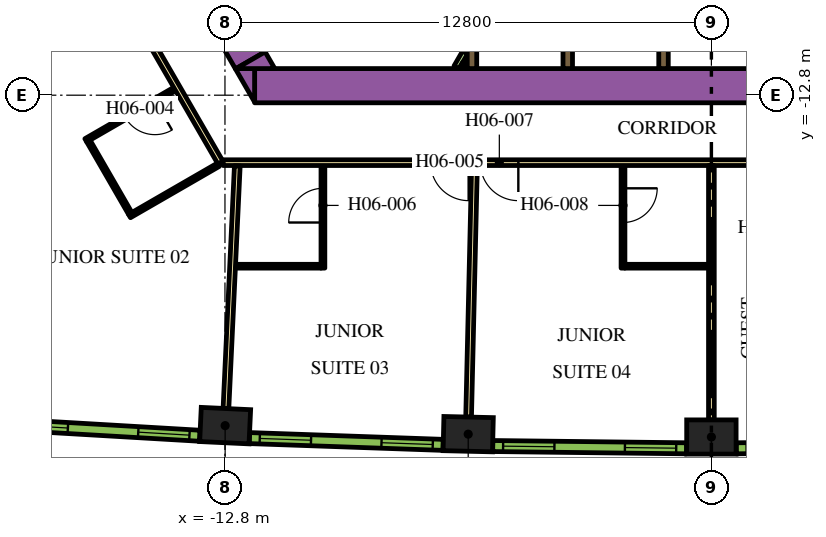
"""IFC4 building model, lengths in metres.
Left out: names, types, materials, properties, quantities, classifications, styles, units other than length and angle.
Written with IfcOpenShell. Run it as: python <this file> out.ifc"""

import sys

from ifc_helpers import new_model, si_unit, direction, frame, frame_2d, origin, origin_2d, place, context, subcontext, project, spatial, polyline, rectangle, outline, extrude, element, fill, save


model = new_model("IFC4")
c1 = context("Model", 3, precision=1e-05, world=origin(), true_north=direction((0.0, 1.0)))
c2 = subcontext(c1, "Body", "Model", "MODEL_VIEW")
j1 = project(units=[si_unit("LENGTHUNIT", "METRE"), si_unit("PLANEANGLEUNIT", "RADIAN")], contexts=[c1])
p1 = place(None, origin())
s1 = spatial("IfcSite", under=j1, at=p1, CompositionType="ELEMENT")
p2 = place(p1, origin())
s2 = spatial("IfcBuilding", under=s1, at=p2, CompositionType="ELEMENT")
p3 = place(p2, frame((0.0, 0.0, 87.6)))
s3 = spatial("IfcBuildingStorey", under=s2, at=p3, CompositionType="ELEMENT", Elevation=87.6)
for number, where, z_axis, x_axis in (
    (1, (-12.795, -21.494, 0.0), (0.0, 0.0, 1.0), (0.999, -0.047, 0.0)),
    (2, (-6.399, -21.719, 0.0), (0.0, 0.0, 1.0), (1.0, -0.023, 0.0)),
    (3, (0.0, -21.794, 0.0), (0.0, 0.0, 1.0), (1.0, 0.0, 0.0)),
):
    element("IfcColumn", number, at=place(p3, frame(where, z_axis=z_axis, x_axis=x_axis)), inside=s3, PredefinedType="COLUMN", context=c2, shape_type="SweptSolid", body=[
        extrude(rectangle(XDim=1.3, YDim=0.9, at=origin_2d()), origin(), (0.0, 0.0, 1.0), 3.9),
    ])
p4 = place(p3, frame((-12.019, -12.55, 0.0), z_axis=(0.0, 0.0, 1.0), x_axis=(1.0, 0.0, 0.0)))
e4 = element("IfcWall", 4, at=p4, inside=s3, PredefinedType="SOLIDWALL", context=c2, shape_type="SweptSolid", body=[
    extrude(rectangle(XDim=21.63, YDim=0.9, at=frame_2d((10.815, 0.0))), origin(), (0.0, 0.0, 1.0), 3.9),
])
p5 = place(p3, origin())
e5 = element("IfcWall", 5, at=p5, inside=s3, PredefinedType="SOLIDWALL", context=c2, shape_type="SweptSolid", body=[
    extrude(outline(polyline([(-12.529, -12.1), (-12.021, -12.1), (-12.021, -12.98), (-12.529, -12.1)])), origin(), (0.0, 0.0, 1.0), 3.9),
])
p6 = place(p3, frame((-12.134, -11.883, 0.0), z_axis=(0.0, 0.0, 1.0), x_axis=(-0.500005339912, 0.866022320763, 0.0)))
e6 = element("IfcWall", 6, at=p6, inside=s3, PredefinedType="SOLIDWALL", context=c2, shape_type="SweptSolid", body=[
    extrude(rectangle(XDim=9.488, YDim=0.9, at=frame_2d((4.744, 0.0))), origin(), (0.0, 0.0, 1.0), 3.9),
])
e7 = element("IfcWall", 7, at=p5, inside=s3, PredefinedType="SOLIDWALL", context=c2, shape_type="SweptSolid", body=[
    extrude(outline(polyline([(-11.489, -12.1), (-12.505, -12.1), (-11.743, -11.66), (-11.489, -12.1)])), origin(), (0.0, 0.0, 1.0), 3.9),
])
p7 = place(p3, frame((-3.78, -12.1, 0.0), z_axis=(0.0, 0.0, 1.0), x_axis=(0.0, 1.0, 0.0)))
e8 = element("IfcWall", 8, at=p7, inside=s3, PredefinedType="SOLIDWALL", context=c2, shape_type="SweptSolid", body=[
    extrude(rectangle(XDim=2.2, YDim=0.25, at=frame_2d((1.1, 0.0))), origin(), (0.0, 0.0, 1.0), 3.9),
])
p8 = place(p3, frame((-6.3, -12.1, 0.0), z_axis=(0.0, 0.0, 1.0), x_axis=(0.0, 1.0, 0.0)))
e9 = element("IfcWall", 9, at=p8, inside=s3, PredefinedType="SOLIDWALL", context=c2, shape_type="SweptSolid", body=[
    extrude(rectangle(XDim=3.146, YDim=0.25, at=frame_2d((1.573, 0.0))), origin(), (0.0, 0.0, 1.0), 3.9),
])
p9 = place(p3, frame((-1.26, -12.1, 0.0), z_axis=(0.0, 0.0, 1.0), x_axis=(0.0, 1.0, 0.0)))
e10 = element("IfcWall", 10, at=p9, inside=s3, PredefinedType="SOLIDWALL", context=c2, shape_type="SweptSolid", body=[
    extrude(rectangle(XDim=2.2, YDim=0.25, at=frame_2d((1.1, 0.0))), origin(), (0.0, 0.0, 1.0), 3.9),
])
p10 = place(p3, frame((-6.708, -12.068, 0.0), z_axis=(0.0, 0.0, 1.0), x_axis=(0.500000789788, 0.8660249478, 0.0)))
e11 = element("IfcWall", 11, at=p10, inside=s3, PredefinedType="PARTITIONING", context=c2, shape_type="SweptSolid", body=[
    extrude(rectangle(XDim=0.456, YDim=0.15, at=frame_2d((0.228, 0.0))), origin(), (0.0, 0.0, 1.0), 2.75),
])
p11 = place(p3, frame((-6.534, -12.068, 0.0), z_axis=(0.0, 0.0, 1.0), x_axis=(0.500240224089, 0.865886665912, 0.0)))
e12 = element("IfcWall", 12, at=p11, inside=s3, PredefinedType="PARTITIONING", context=c2, shape_type="SweptSolid", body=[
    extrude(rectangle(XDim=0.109, YDim=0.15, at=frame_2d((0.054, 0.0))), origin(), (0.0, 0.0, 1.0), 2.75),
])
p12 = place(p3, frame((-28.211, -15.335, 0.0), z_axis=(0.0, 0.0, 1.0), x_axis=(0.866025884867, 0.49999916674, 0.0)))
e13 = element("IfcWall", 13, at=p12, inside=s3, PredefinedType="PARTITIONING", context=c2, shape_type="SweptSolid", body=[
    extrude(rectangle(XDim=13.543, YDim=0.15, at=frame_2d((6.772, 0.0))), origin(), (0.0, 0.0, 1.0), 2.75),
])
p13 = place(p12, frame((12.214, 0.0, 0.0)))
e14 = element("IfcOpeningElement", 14, at=p13, cuts=e13, PredefinedType="OPENING", context=c2, shape_type="SweptSolid", body=[
    extrude(rectangle(XDim=1.0, YDim=2.1, at=frame_2d((0.5, 1.05))), frame((0.0, 0.085, 0.0), z_axis=(0.0, -1.0, 0.0), x_axis=(1.0, 0.0, 0.0)), (0.0, 0.0, 1.0), 0.17),
])
p14 = place(p12, frame((8.488, 0.0, 0.0)))
e15 = element("IfcOpeningElement", 15, at=p14, cuts=e13, PredefinedType="OPENING", context=c2, shape_type="SweptSolid", body=[
    extrude(rectangle(XDim=1.0, YDim=2.1, at=frame_2d((0.5, 1.05))), frame((0.0, 0.085, 0.0), z_axis=(0.0, -1.0, 0.0), x_axis=(1.0, 0.0, 0.0)), (0.0, 0.0, 1.0), 0.17),
])
p15 = place(p3, frame((-15.587, -9.952, 0.0), z_axis=(0.0, 0.0, 1.0), x_axis=(-0.866017869832, -0.500013048961, 0.0)))
e16 = element("IfcWall", 16, at=p15, inside=s3, PredefinedType="PARTITIONING", context=c2, shape_type="SweptSolid", body=[
    extrude(rectangle(XDim=13.624, YDim=0.15, at=frame_2d((6.812, 0.0))), origin(), (0.0, 0.0, 1.0), 2.75),
])
p16 = place(p15, frame((4.134, 0.0, 0.0)))
e17 = element("IfcOpeningElement", 17, at=p16, cuts=e16, PredefinedType="OPENING", context=c2, shape_type="SweptSolid", body=[
    extrude(rectangle(XDim=1.0, YDim=2.1, at=frame_2d((0.5, 1.05))), frame((0.0, 0.085, 0.0), z_axis=(0.0, -1.0, 0.0), x_axis=(1.0, 0.0, 0.0)), (0.0, 0.0, 1.0), 0.17),
])
p17 = place(p3, frame((-12.918, -14.575, 0.0), z_axis=(0.0, 0.0, 1.0), x_axis=(-0.500009150678, 0.866020120573, 0.0)))
e18 = element("IfcWall", 18, at=p17, inside=s3, PredefinedType="PARTITIONING", context=c2, shape_type="SweptSolid", body=[
    extrude(rectangle(XDim=5.258, YDim=0.15, at=frame_2d((2.629, 0.0))), origin(), (0.0, 0.0, 1.0), 2.75),
])
p18 = place(p17, frame((4.078, 0.0, 0.0)))
e19 = element("IfcOpeningElement", 19, at=p18, cuts=e18, PredefinedType="OPENING", context=c2, shape_type="SweptSolid", body=[
    extrude(rectangle(XDim=1.0, YDim=2.1, at=frame_2d((0.5, 1.05))), frame((0.0, 0.085, 0.0), z_axis=(0.0, -1.0, 0.0), x_axis=(1.0, 0.0, 0.0)), (0.0, 0.0, 1.0), 0.17),
])
p19 = place(p3, frame((12.918, -14.575, 0.0), z_axis=(0.0, 0.0, 1.0), x_axis=(-1.0, 0.0, 0.0)))
e20 = element("IfcWall", 20, at=p19, inside=s3, PredefinedType="PARTITIONING", context=c2, shape_type="SweptSolid", body=[
    extrude(rectangle(XDim=25.766, YDim=0.15, at=frame_2d((12.883, 0.0))), origin(), (0.0, 0.0, 1.0), 2.75),
])
p20 = place(p19, frame((19.306, 0.0, 0.0)))
e21 = element("IfcOpeningElement", 21, at=p20, cuts=e20, PredefinedType="OPENING", context=c2, shape_type="SweptSolid", body=[
    extrude(rectangle(XDim=1.0, YDim=2.1, at=frame_2d((0.5, 1.05))), frame((0.0, 0.085, 0.0), z_axis=(0.0, -1.0, 0.0), x_axis=(1.0, 0.0, 0.0)), (0.0, 0.0, 1.0), 0.17),
])
p21 = place(p19, frame((17.999, 0.0, 0.0)))
e22 = element("IfcOpeningElement", 22, at=p21, cuts=e20, PredefinedType="OPENING", context=c2, shape_type="SweptSolid", body=[
    extrude(rectangle(XDim=1.0, YDim=2.1, at=frame_2d((0.5, 1.05))), frame((0.0, 0.085, 0.0), z_axis=(0.0, -1.0, 0.0), x_axis=(1.0, 0.0, 0.0)), (0.0, 0.0, 1.0), 0.17),
])
p22 = place(p19, frame((10.874, 0.0, 0.0)))
e23 = element("IfcOpeningElement", 23, at=p22, cuts=e20, PredefinedType="OPENING", context=c2, shape_type="SweptSolid", body=[
    extrude(rectangle(XDim=0.9, YDim=2.1, at=frame_2d((0.45, 1.05))), frame((0.0, 0.085, 0.0), z_axis=(0.0, -1.0, 0.0), x_axis=(1.0, 0.0, 0.0)), (0.0, 0.0, 1.0), 0.17),
])
p23 = place(p19, frame((8.647, 0.0, 0.0)))
e24 = element("IfcOpeningElement", 24, at=p23, cuts=e20, PredefinedType="OPENING", context=c2, shape_type="SweptSolid", body=[
    extrude(rectangle(XDim=1.0, YDim=2.1, at=frame_2d((0.5, 1.05))), frame((0.0, 0.085, 0.0), z_axis=(0.0, -1.0, 0.0), x_axis=(1.0, 0.0, 0.0)), (0.0, 0.0, 1.0), 0.17),
])
p24 = place(p19, frame((0.18, 0.0, 0.0)))
e25 = element("IfcOpeningElement", 25, at=p24, cuts=e20, PredefinedType="OPENING", context=c2, shape_type="SweptSolid", body=[
    extrude(rectangle(XDim=1.0, YDim=2.1, at=frame_2d((0.5, 1.05))), frame((0.0, 0.085, 0.0), z_axis=(0.0, -1.0, 0.0), x_axis=(1.0, 0.0, 0.0)), (0.0, 0.0, 1.0), 0.17),
])
p25 = place(p3, frame((-12.774, -21.045, 0.0), z_axis=(0.0, 0.0, 1.0), x_axis=(0.046750341626, 0.998906605023, 0.0)))
e26 = element("IfcWall", 26, at=p25, inside=s3, PredefinedType="PARTITIONING", context=c2, shape_type="SweptSolid", body=[
    extrude(rectangle(XDim=6.392, YDim=0.15, at=frame_2d((3.196, 0.0))), origin(), (0.0, 0.0, 1.0), 2.75),
])
p26 = place(p3, frame((-6.389, -21.269, 0.0), z_axis=(0.0, 0.0, 1.0), x_axis=(0.023377429176, 0.999726710559, 0.0)))
e27 = element("IfcWall", 27, at=p26, inside=s3, PredefinedType="PARTITIONING", context=c2, shape_type="SweptSolid", body=[
    extrude(rectangle(XDim=6.611, YDim=0.15, at=frame_2d((3.305, 0.0))), origin(), (0.0, 0.0, 1.0), 2.75),
])
p27 = place(p3, frame((0.0, -21.344, 0.0), z_axis=(0.0, 0.0, 1.0), x_axis=(0.0, 1.0, 0.0)))
e28 = element("IfcWall", 28, at=p27, inside=s3, PredefinedType="PARTITIONING", context=c2, shape_type="SweptSolid", body=[
    extrude(rectangle(XDim=6.694, YDim=0.15, at=frame_2d((3.347, 0.0))), origin(), (0.0, 0.0, 1.0), 2.75),
])
p28 = place(p3, frame((-14.123, -12.638, 0.0), z_axis=(0.0, 0.0, 1.0), x_axis=(-0.86599734893, -0.500048589285, 0.0)))
e29 = element("IfcWall", 29, at=p28, inside=s3, PredefinedType="PARTITIONING", context=c2, shape_type="SweptSolid", body=[
    extrude(rectangle(XDim=2.7, YDim=0.1, at=frame_2d((1.35, 0.0))), origin(), (0.0, 0.0, 1.0), 2.75),
])
p29 = place(p28, frame((0.6, 0.0, 0.0)))
e30 = element("IfcOpeningElement", 30, at=p29, cuts=e29, PredefinedType="OPENING", context=c2, shape_type="SweptSolid", body=[
    extrude(rectangle(XDim=0.9, YDim=2.1, at=frame_2d((0.45, 1.05))), frame((0.0, 0.06, 0.0), z_axis=(0.0, -1.0, 0.0), x_axis=(1.0, 0.0, 0.0)), (0.0, 0.0, 1.0), 0.12),
])
p30 = place(p3, frame((-16.393, -14.006, 0.0), z_axis=(0.0, 0.0, 1.0), x_axis=(0.499946605688, -0.86605622881, 0.0)))
e31 = element("IfcWall", 31, at=p30, inside=s3, PredefinedType="PARTITIONING", context=c2, shape_type="SweptSolid", body=[
    extrude(rectangle(XDim=2.2, YDim=0.1, at=frame_2d((1.1, 0.0))), origin(), (0.0, 0.0, 1.0), 2.75),
])
p31 = place(p3, frame((-12.973, -14.63, 0.0), z_axis=(0.0, 0.0, 1.0), x_axis=(-0.866036505625, -0.499980770555, 0.0)))
e32 = element("IfcWall", 32, at=p31, inside=s3, PredefinedType="PARTITIONING", context=c2, shape_type="SweptSolid", body=[
    extrude(rectangle(XDim=2.7, YDim=0.1, at=frame_2d((1.35, 0.0))), origin(), (0.0, 0.0, 1.0), 2.75),
])
p32 = place(p3, frame((-10.222, -17.35, 0.0), z_axis=(0.0, 0.0, 1.0), x_axis=(0.0, 1.0, 0.0)))
e33 = element("IfcWall", 33, at=p32, inside=s3, PredefinedType="PARTITIONING", context=c2, shape_type="SweptSolid", body=[
    extrude(rectangle(XDim=2.7, YDim=0.1, at=frame_2d((1.35, 0.0))), origin(), (0.0, 0.0, 1.0), 2.75),
])
p33 = place(p32, frame((1.2, 0.0, 0.0)))
e34 = element("IfcOpeningElement", 34, at=p33, cuts=e33, PredefinedType="OPENING", context=c2, shape_type="SweptSolid", body=[
    extrude(rectangle(XDim=0.9, YDim=2.1, at=frame_2d((0.45, 1.05))), frame((0.0, 0.06, 0.0), z_axis=(0.0, -1.0, 0.0), x_axis=(1.0, 0.0, 0.0)), (0.0, 0.0, 1.0), 0.12),
])
p34 = place(p3, frame((-10.272, -17.3, 0.0), z_axis=(0.0, 0.0, 1.0), x_axis=(-1.0, 0.0, 0.0)))
e35 = element("IfcWall", 35, at=p34, inside=s3, PredefinedType="PARTITIONING", context=c2, shape_type="SweptSolid", body=[
    extrude(rectangle(XDim=2.25, YDim=0.1, at=frame_2d((1.125, 0.0))), origin(), (0.0, 0.0, 1.0), 2.75),
])
p35 = place(p3, frame((-2.326, -14.65, 0.0), z_axis=(0.0, 0.0, 1.0), x_axis=(0.0, -1.0, 0.0)))
e36 = element("IfcWall", 36, at=p35, inside=s3, PredefinedType="PARTITIONING", context=c2, shape_type="SweptSolid", body=[
    extrude(rectangle(XDim=2.7, YDim=0.1, at=frame_2d((1.35, 0.0))), origin(), (0.0, 0.0, 1.0), 2.75),
])
p36 = place(p35, frame((0.6, 0.0, 0.0)))
e37 = element("IfcOpeningElement", 37, at=p36, cuts=e36, PredefinedType="OPENING", context=c2, shape_type="SweptSolid", body=[
    extrude(rectangle(XDim=0.9, YDim=2.1, at=frame_2d((0.45, 1.05))), frame((0.0, 0.06, 0.0), z_axis=(0.0, -1.0, 0.0), x_axis=(1.0, 0.0, 0.0)), (0.0, 0.0, 1.0), 0.12),
])
p37 = place(p3, frame((-2.276, -17.3, 0.0), z_axis=(0.0, 0.0, 1.0), x_axis=(1.0, 0.0, 0.0)))
e38 = element("IfcWall", 38, at=p37, inside=s3, PredefinedType="PARTITIONING", context=c2, shape_type="SweptSolid", body=[
    extrude(rectangle(XDim=2.2, YDim=0.1, at=frame_2d((1.1, 0.0))), origin(), (0.0, 0.0, 1.0), 2.75),
])
p38 = place(p3, frame((-18.553, -21.463, 0.0), z_axis=(0.0, 0.0, 1.0), x_axis=(0.998290511436, -0.058447025388, 0.0)))
e39 = element("IfcWall", 39, at=p38, inside=s3, PredefinedType="SOLIDWALL", context=c2, shape_type="SweptSolid", body=[
    extrude(rectangle(XDim=5.1, YDim=0.29, at=frame_2d((2.55, 0.0))), origin(), (0.0, 0.0, 1.0), 3.65),
])
p39 = place(p38, frame((0.273, 0.0, 0.9)))
e40 = element("IfcOpeningElement", 40, at=p39, cuts=e39, PredefinedType="OPENING", context=c2, shape_type="SweptSolid", body=[
    extrude(rectangle(XDim=1.35, YDim=2.15, at=frame_2d((0.675, 1.075))), frame((0.0, 0.155, 0.0), z_axis=(0.0, -1.0, 0.0), x_axis=(1.0, 0.0, 0.0)), (0.0, 0.0, 1.0), 0.31),
])
p40 = place(p38, frame((3.478, 0.0, 0.9)))
e41 = element("IfcOpeningElement", 41, at=p40, cuts=e39, PredefinedType="OPENING", context=c2, shape_type="SweptSolid", body=[
    extrude(rectangle(XDim=1.35, YDim=2.15, at=frame_2d((0.675, 1.075))), frame((0.0, 0.155, 0.0), z_axis=(0.0, -1.0, 0.0), x_axis=(1.0, 0.0, 0.0)), (0.0, 0.0, 1.0), 0.31),
])
p41 = place(p3, frame((-12.157, -21.822, 0.0), z_axis=(0.0, 0.0, 1.0), x_axis=(0.999385993957, -0.035037623812, 0.0)))
e42 = element("IfcWall", 42, at=p41, inside=s3, PredefinedType="SOLIDWALL", context=c2, shape_type="SweptSolid", body=[
    extrude(rectangle(XDim=5.101, YDim=0.29, at=frame_2d((2.55, 0.0))), origin(), (0.0, 0.0, 1.0), 3.65),
])
p42 = place(p41, frame((0.273, 0.0, 0.9)))
e43 = element("IfcOpeningElement", 43, at=p42, cuts=e42, PredefinedType="OPENING", context=c2, shape_type="SweptSolid", body=[
    extrude(rectangle(XDim=1.35, YDim=2.15, at=frame_2d((0.675, 1.075))), frame((0.0, 0.155, 0.0), z_axis=(0.0, -1.0, 0.0), x_axis=(1.0, 0.0, 0.0)), (0.0, 0.0, 1.0), 0.31),
])
p43 = place(p41, frame((3.478, 0.0, 0.9)))
e44 = element("IfcOpeningElement", 44, at=p43, cuts=e42, PredefinedType="OPENING", context=c2, shape_type="SweptSolid", body=[
    extrude(rectangle(XDim=1.35, YDim=2.15, at=frame_2d((0.675, 1.075))), frame((0.0, 0.155, 0.0), z_axis=(0.0, -1.0, 0.0), x_axis=(1.0, 0.0, 0.0)), (0.0, 0.0, 1.0), 0.31),
])
p44 = place(p3, frame((-5.753, -22.031, 0.0), z_axis=(0.0, 0.0, 1.0), x_axis=(0.999931786565, -0.011679992145, 0.0)))
e45 = element("IfcWall", 45, at=p44, inside=s3, PredefinedType="SOLIDWALL", context=c2, shape_type="SweptSolid", body=[
    extrude(rectangle(XDim=5.1, YDim=0.29, at=frame_2d((2.55, 0.0))), origin(), (0.0, 0.0, 1.0), 3.65),
])
p45 = place(p44, frame((0.272, 0.0, 0.9)))
e46 = element("IfcOpeningElement", 46, at=p45, cuts=e45, PredefinedType="OPENING", context=c2, shape_type="SweptSolid", body=[
    extrude(rectangle(XDim=1.35, YDim=2.15, at=frame_2d((0.675, 1.075))), frame((0.0, 0.155, 0.0), z_axis=(0.0, -1.0, 0.0), x_axis=(1.0, 0.0, 0.0)), (0.0, 0.0, 1.0), 0.31),
])
p46 = place(p44, frame((3.478, 0.0, 0.9)))
e47 = element("IfcOpeningElement", 47, at=p46, cuts=e45, PredefinedType="OPENING", context=c2, shape_type="SweptSolid", body=[
    extrude(rectangle(XDim=1.35, YDim=2.15, at=frame_2d((0.675, 1.075))), frame((0.0, 0.155, 0.0), z_axis=(0.0, -1.0, 0.0), x_axis=(1.0, 0.0, 0.0)), (0.0, 0.0, 1.0), 0.31),
])
p47 = place(p3, frame((0.653, -22.091, 0.0), z_axis=(0.0, 0.0, 1.0), x_axis=(0.999931786565, 0.011679992145, 0.0)))
e48 = element("IfcWall", 48, at=p47, inside=s3, PredefinedType="SOLIDWALL", context=c2, shape_type="SweptSolid", body=[
    extrude(rectangle(XDim=5.1, YDim=0.29, at=frame_2d((2.55, 0.0))), origin(), (0.0, 0.0, 1.0), 3.65),
])
p48 = place(p47, frame((0.273, 0.0, 0.9)))
e49 = element("IfcOpeningElement", 49, at=p48, cuts=e48, PredefinedType="OPENING", context=c2, shape_type="SweptSolid", body=[
    extrude(rectangle(XDim=1.35, YDim=2.15, at=frame_2d((0.675, 1.075))), frame((0.0, 0.155, 0.0), z_axis=(0.0, -1.0, 0.0), x_axis=(1.0, 0.0, 0.0)), (0.0, 0.0, 1.0), 0.31),
])
p49 = place(p47, frame((3.478, 0.0, 0.9)))
e50 = element("IfcOpeningElement", 50, at=p49, cuts=e48, PredefinedType="OPENING", context=c2, shape_type="SweptSolid", body=[
    extrude(rectangle(XDim=1.35, YDim=2.15, at=frame_2d((0.675, 1.075))), frame((0.0, 0.155, 0.0), z_axis=(0.0, -1.0, 0.0), x_axis=(1.0, 0.0, 0.0)), (0.0, 0.0, 1.0), 0.31),
])
p50 = place(p29, origin())
e51 = element("IfcDoor", 51, at=p50, inside=s3, OperationType="SINGLE_SWING_LEFT", PredefinedType="DOOR", context=c2, shape_type="SweptSolid", body=[
    extrude(rectangle(XDim=0.9, YDim=2.1, at=frame_2d((0.45, 1.05))), frame((0.0, 0.025, 0.0), z_axis=(0.0, -1.0, 0.0), x_axis=(1.0, 0.0, 0.0)), (0.0, 0.0, 1.0), 0.05),
])
fill(e30, e51)
p51 = place(p20, origin())
e52 = element("IfcDoor", 52, at=p51, inside=s3, OperationType="SINGLE_SWING_LEFT", PredefinedType="DOOR", context=c2, shape_type="SweptSolid", body=[
    extrude(rectangle(XDim=1.0, YDim=2.1, at=frame_2d((0.5, 1.05))), frame((0.0, 0.025, 0.0), z_axis=(0.0, -1.0, 0.0), x_axis=(1.0, 0.0, 0.0)), (0.0, 0.0, 1.0), 0.05),
])
fill(e21, e52)
p52 = place(p33, origin())
e53 = element("IfcDoor", 53, at=p52, inside=s3, OperationType="SINGLE_SWING_RIGHT", PredefinedType="DOOR", context=c2, shape_type="SweptSolid", body=[
    extrude(rectangle(XDim=0.9, YDim=2.1, at=frame_2d((0.45, 1.05))), frame((0.0, 0.025, 0.0), z_axis=(0.0, -1.0, 0.0), x_axis=(1.0, 0.0, 0.0)), (0.0, 0.0, 1.0), 0.05),
])
fill(e34, e53)
p53 = place(p21, origin())
e54 = element("IfcDoor", 54, at=p53, inside=s3, OperationType="SINGLE_SWING_RIGHT", PredefinedType="DOOR", context=c2, shape_type="SweptSolid", body=[
    extrude(rectangle(XDim=1.0, YDim=2.1, at=frame_2d((0.5, 1.05))), frame((0.0, 0.025, 0.0), z_axis=(0.0, -1.0, 0.0), x_axis=(1.0, 0.0, 0.0)), (0.0, 0.0, 1.0), 0.05),
])
fill(e22, e54)
p54 = place(p36, origin())
e55 = element("IfcDoor", 55, at=p54, inside=s3, OperationType="SINGLE_SWING_LEFT", PredefinedType="DOOR", context=c2, shape_type="SweptSolid", body=[
    extrude(rectangle(XDim=0.9, YDim=2.1, at=frame_2d((0.45, 1.05))), frame((0.0, 0.025, 0.0), z_axis=(0.0, -1.0, 0.0), x_axis=(1.0, 0.0, 0.0)), (0.0, 0.0, 1.0), 0.05),
])
fill(e37, e55)
p55 = place(p39, origin())
e56 = element("IfcWindow", 56, at=p55, inside=s3, PartitioningType="DOUBLE_PANEL_VERTICAL", PredefinedType="WINDOW", context=c2, shape_type="SweptSolid", body=[
    extrude(rectangle(XDim=1.35, YDim=2.15, at=frame_2d((0.675, 1.075))), frame((0.0, 0.015, 0.0), z_axis=(0.0, -1.0, 0.0), x_axis=(1.0, 0.0, 0.0)), (0.0, 0.0, 1.0), 0.06),
])
fill(e40, e56)
p56 = place(p40, origin())
e57 = element("IfcWindow", 57, at=p56, inside=s3, PartitioningType="DOUBLE_PANEL_VERTICAL", PredefinedType="WINDOW", context=c2, shape_type="SweptSolid", body=[
    extrude(rectangle(XDim=1.35, YDim=2.15, at=frame_2d((0.675, 1.075))), frame((0.0, 0.015, 0.0), z_axis=(0.0, -1.0, 0.0), x_axis=(1.0, 0.0, 0.0)), (0.0, 0.0, 1.0), 0.06),
])
fill(e41, e57)
p57 = place(p42, origin())
e58 = element("IfcWindow", 58, at=p57, inside=s3, PartitioningType="DOUBLE_PANEL_VERTICAL", PredefinedType="WINDOW", context=c2, shape_type="SweptSolid", body=[
    extrude(rectangle(XDim=1.35, YDim=2.15, at=frame_2d((0.675, 1.075))), frame((0.0, 0.015, 0.0), z_axis=(0.0, -1.0, 0.0), x_axis=(1.0, 0.0, 0.0)), (0.0, 0.0, 1.0), 0.06),
])
fill(e43, e58)
p58 = place(p43, origin())
e59 = element("IfcWindow", 59, at=p58, inside=s3, PartitioningType="DOUBLE_PANEL_VERTICAL", PredefinedType="WINDOW", context=c2, shape_type="SweptSolid", body=[
    extrude(rectangle(XDim=1.35, YDim=2.15, at=frame_2d((0.675, 1.075))), frame((0.0, 0.015, 0.0), z_axis=(0.0, -1.0, 0.0), x_axis=(1.0, 0.0, 0.0)), (0.0, 0.0, 1.0), 0.06),
])
fill(e44, e59)
p59 = place(p45, origin())
e60 = element("IfcWindow", 60, at=p59, inside=s3, PartitioningType="DOUBLE_PANEL_VERTICAL", PredefinedType="WINDOW", context=c2, shape_type="SweptSolid", body=[
    extrude(rectangle(XDim=1.35, YDim=2.15, at=frame_2d((0.675, 1.075))), frame((0.0, 0.015, 0.0), z_axis=(0.0, -1.0, 0.0), x_axis=(1.0, 0.0, 0.0)), (0.0, 0.0, 1.0), 0.06),
])
fill(e46, e60)
p60 = place(p46, origin())
e61 = element("IfcWindow", 61, at=p60, inside=s3, PartitioningType="DOUBLE_PANEL_VERTICAL", PredefinedType="WINDOW", context=c2, shape_type="SweptSolid", body=[
    extrude(rectangle(XDim=1.35, YDim=2.15, at=frame_2d((0.675, 1.075))), frame((0.0, 0.015, 0.0), z_axis=(0.0, -1.0, 0.0), x_axis=(1.0, 0.0, 0.0)), (0.0, 0.0, 1.0), 0.06),
])
fill(e47, e61)
save(model, sys.argv[1])
